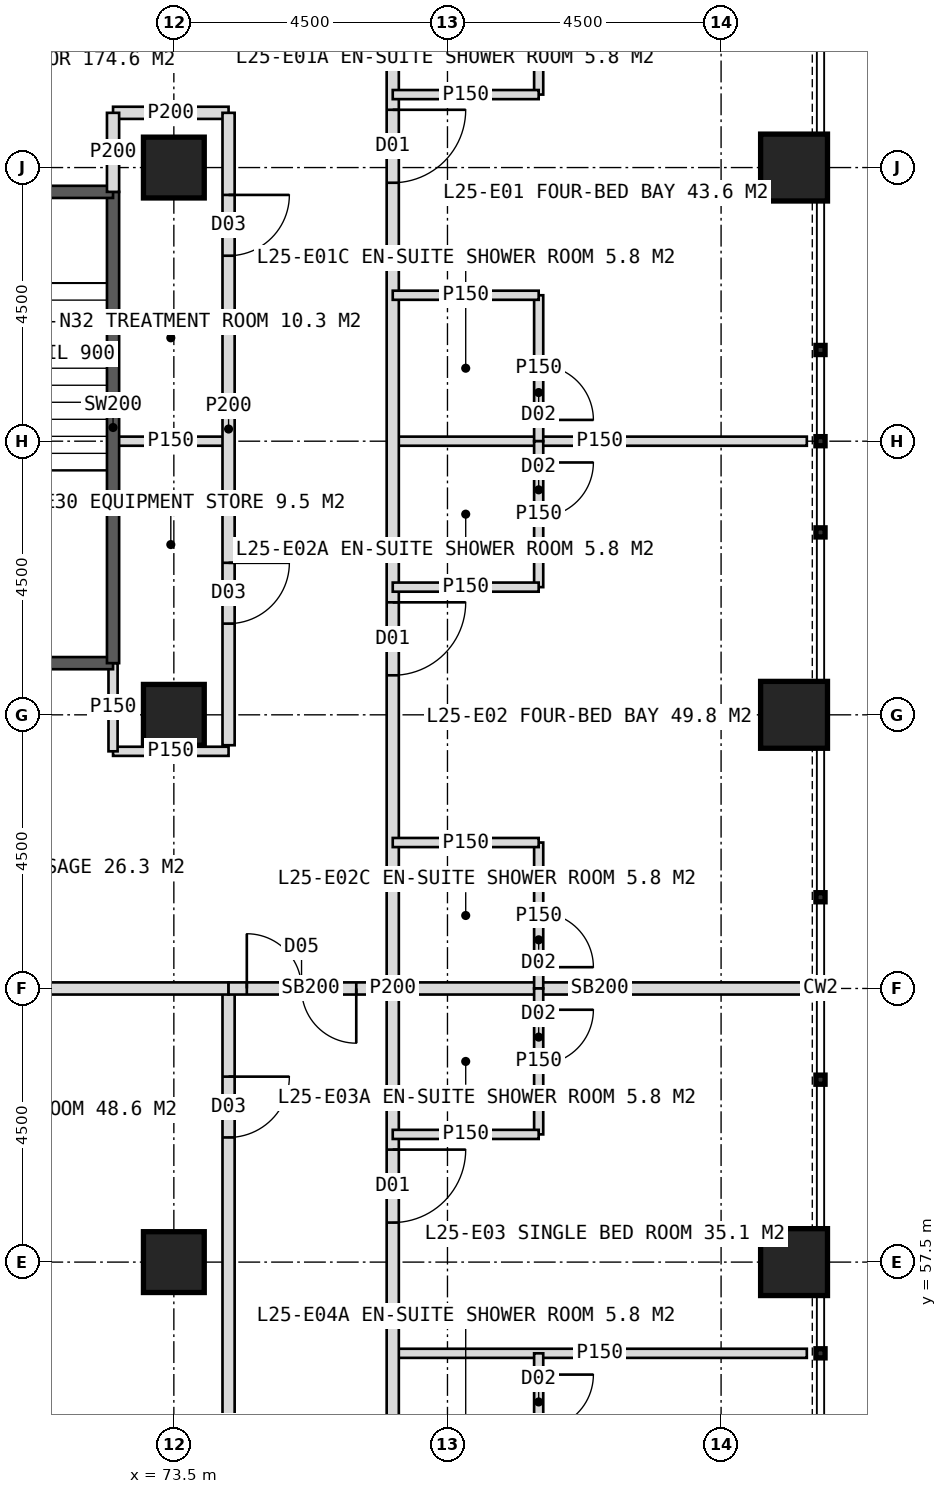
"""IFC4 building model, lengths in metres.
Left out: names, types, materials, properties, quantities, classifications, styles, units other than length and angle.
Written with IfcOpenShell. Run it as: python <this file> out.ifc"""

import sys

from ifc_helpers import new_model, si_unit, direction, frame, frame_2d, origin, origin_2d, place, context, subcontext, project, spatial, rectangle, hollow_rectangle, extrude, element, fill, save


model = new_model("IFC4")
c1 = context("Model", 3, precision=1e-05, world=origin(), true_north=direction((0.0, 1.0)))
c2 = subcontext(c1, "Body", "Model", "MODEL_VIEW")
j1 = project(units=[si_unit("LENGTHUNIT", "METRE"), si_unit("PLANEANGLEUNIT", "RADIAN")], contexts=[c1])
p1 = place(None, origin())
s1 = spatial("IfcSite", under=j1, at=p1, CompositionType="ELEMENT")
p2 = place(p1, origin())
s2 = spatial("IfcBuilding", under=s1, at=p2, CompositionType="ELEMENT")
p3 = place(p2, frame((0.0, 0.0, 108.0)))
s3 = spatial("IfcBuildingStorey", under=s2, at=p3, CompositionType="ELEMENT", Elevation=108.0)
for number, where, z_axis, x_axis in (
    (1, (73.5, 75.5, 0.0), (0.0, 0.0, 1.0), (1.0, 0.0, 0.0)),
    (2, (73.5, 57.5, 0.0), (0.0, 0.0, 1.0), (1.0, 0.0, 0.0)),
    (3, (73.5, 66.5, 0.0), (0.0, 0.0, 1.0), (1.0, 0.0, 0.0)),
):
    element("IfcColumn", number, at=place(p3, frame(where, z_axis=z_axis, x_axis=x_axis)), inside=s3, PredefinedType="COLUMN", context=c2, shape_type="SweptSolid", body=[
        extrude(hollow_rectangle(XDim=1.0, YDim=1.0, WallThickness=0.1, at=origin_2d()), origin(), (0.0, 0.0, 1.0), 4.0),
    ])
for number, where, z_axis, x_axis in (
    (4, (83.7, 57.5, 0.0), (0.0, 0.0, 1.0), (1.0, 0.0, 0.0)),
    (5, (83.7, 66.5, 0.0), (0.0, 0.0, 1.0), (1.0, 0.0, 0.0)),
    (6, (83.7, 75.5, 0.0), (0.0, 0.0, 1.0), (1.0, 0.0, 0.0)),
):
    element("IfcColumn", number, at=place(p3, frame(where, z_axis=z_axis, x_axis=x_axis)), inside=s3, PredefinedType="COLUMN", context=c2, shape_type="SweptSolid", body=[
        extrude(hollow_rectangle(XDim=1.1, YDim=1.1, WallThickness=0.1, at=origin_2d()), origin(), (0.0, 0.0, 1.0), 4.0),
    ])
p4 = place(p3, frame((72.5, 76.4, 0.0), z_axis=(0.0, 0.0, 1.0), x_axis=(1.0, 0.0, 0.0)))
e7 = element("IfcWall", 7, at=p4, inside=s3, PredefinedType="PARTITIONING", context=c2, shape_type="SweptSolid", body=[
    extrude(rectangle(XDim=1.9, YDim=0.2, at=frame_2d((0.95, 0.0))), origin(), (0.0, 0.0, 1.0), 3.75),
])
p5 = place(p3, frame((77.1, 71.0, 0.0), z_axis=(0.0, 0.0, 1.0), x_axis=(1.0, 0.0, 0.0)))
e8 = element("IfcWall", 8, at=p5, inside=s3, PredefinedType="PARTITIONING", context=c2, shape_type="SweptSolid", body=[
    extrude(rectangle(XDim=6.81, YDim=0.15, at=frame_2d((3.405, 0.0))), origin(), (0.0, 0.0, 1.0), 3.75),
])
p6 = place(p3, frame((77.1, 62.0, 0.0), z_axis=(0.0, 0.0, 1.0), x_axis=(1.0, 0.0, 0.0)))
e9 = element("IfcWall", 9, at=p6, inside=s3, PredefinedType="SOLIDWALL", context=c2, shape_type="SweptSolid", body=[
    extrude(rectangle(XDim=6.81, YDim=0.2, at=frame_2d((3.405, 0.0))), origin(), (0.0, 0.0, 1.0), 2.95),
])
p7 = place(p3, frame((77.1, 56.0, 0.0), z_axis=(0.0, 0.0, 1.0), x_axis=(1.0, 0.0, 0.0)))
e10 = element("IfcWall", 10, at=p7, inside=s3, PredefinedType="PARTITIONING", context=c2, shape_type="SweptSolid", body=[
    extrude(rectangle(XDim=6.81, YDim=0.15, at=frame_2d((3.405, 0.0))), origin(), (0.0, 0.0, 1.0), 3.75),
])
p8 = place(p3, frame((77.1, 79.1, 0.0), z_axis=(0.0, 0.0, 1.0), x_axis=(0.0, -1.0, 0.0)))
e11 = element("IfcWall", 11, at=p8, inside=s3, PredefinedType="PARTITIONING", context=c2, shape_type="SweptSolid", body=[
    extrude(rectangle(XDim=34.2, YDim=0.2, at=frame_2d((17.1, 0.0))), origin(), (0.0, 0.0, 1.0), 3.75),
])
p9 = place(p8, frame((2.65, 0.0, 0.0)))
e12 = element("IfcOpeningElement", 12, at=p9, cuts=e11, PredefinedType="OPENING", context=c2, shape_type="SweptSolid", body=[
    extrude(rectangle(XDim=1.2, YDim=2.2, at=frame_2d((0.6, 1.1))), frame((0.0, 0.11, 0.0), z_axis=(0.0, -1.0, 0.0), x_axis=(1.0, 0.0, 0.0)), (0.0, 0.0, 1.0), 0.22),
])
p10 = place(p8, frame((10.75, 0.0, 0.0)))
e13 = element("IfcOpeningElement", 13, at=p10, cuts=e11, PredefinedType="OPENING", context=c2, shape_type="SweptSolid", body=[
    extrude(rectangle(XDim=1.2, YDim=2.2, at=frame_2d((0.6, 1.1))), frame((0.0, 0.11, 0.0), z_axis=(0.0, -1.0, 0.0), x_axis=(1.0, 0.0, 0.0)), (0.0, 0.0, 1.0), 0.22),
])
p11 = place(p8, frame((19.75, 0.0, 0.0)))
e14 = element("IfcOpeningElement", 14, at=p11, cuts=e11, PredefinedType="OPENING", context=c2, shape_type="SweptSolid", body=[
    extrude(rectangle(XDim=1.2, YDim=2.2, at=frame_2d((0.6, 1.1))), frame((0.0, 0.11, 0.0), z_axis=(0.0, -1.0, 0.0), x_axis=(1.0, 0.0, 0.0)), (0.0, 0.0, 1.0), 0.22),
])
p12 = place(p8, frame((25.75, 0.0, 0.0)))
e15 = element("IfcOpeningElement", 15, at=p12, cuts=e11, PredefinedType="OPENING", context=c2, shape_type="SweptSolid", body=[
    extrude(rectangle(XDim=1.2, YDim=2.2, at=frame_2d((0.6, 1.1))), frame((0.0, 0.11, 0.0), z_axis=(0.0, -1.0, 0.0), x_axis=(1.0, 0.0, 0.0)), (0.0, 0.0, 1.0), 0.22),
])
p13 = place(p8, frame((30.25, 0.0, 0.0)))
e16 = element("IfcOpeningElement", 16, at=p13, cuts=e11, PredefinedType="OPENING", context=c2, shape_type="SweptSolid", body=[
    extrude(rectangle(XDim=1.2, YDim=2.2, at=frame_2d((0.6, 1.1))), frame((0.0, 0.11, 0.0), z_axis=(0.0, -1.0, 0.0), x_axis=(1.0, 0.0, 0.0)), (0.0, 0.0, 1.0), 0.22),
])
p14 = place(p3, frame((79.5, 79.1, 0.0), z_axis=(0.0, 0.0, 1.0), x_axis=(0.0, -1.0, 0.0)))
e17 = element("IfcWall", 17, at=p14, inside=s3, PredefinedType="PARTITIONING", context=c2, shape_type="SweptSolid", body=[
    extrude(rectangle(XDim=2.4, YDim=0.15, at=frame_2d((1.2, 0.0))), origin(), (0.0, 0.0, 1.0), 3.75),
])
p15 = place(p14, frame((0.35, 0.0, 0.0)))
e18 = element("IfcOpeningElement", 18, at=p15, cuts=e17, PredefinedType="OPENING", context=c2, shape_type="SweptSolid", body=[
    extrude(rectangle(XDim=0.9, YDim=2.1, at=frame_2d((0.45, 1.05))), frame((0.0, 0.085, 0.0), z_axis=(0.0, -1.0, 0.0), x_axis=(1.0, 0.0, 0.0)), (0.0, 0.0, 1.0), 0.17),
])
p16 = place(p3, frame((77.1, 76.7, 0.0), z_axis=(0.0, 0.0, 1.0), x_axis=(1.0, 0.0, 0.0)))
e19 = element("IfcWall", 19, at=p16, inside=s3, PredefinedType="PARTITIONING", context=c2, shape_type="SweptSolid", body=[
    extrude(rectangle(XDim=2.4, YDim=0.15, at=frame_2d((1.2, 0.0))), origin(), (0.0, 0.0, 1.0), 3.75),
])
p17 = place(p3, frame((79.5, 73.4, 0.0), z_axis=(0.0, 0.0, 1.0), x_axis=(0.0, -1.0, 0.0)))
e20 = element("IfcWall", 20, at=p17, inside=s3, PredefinedType="PARTITIONING", context=c2, shape_type="SweptSolid", body=[
    extrude(rectangle(XDim=2.4, YDim=0.15, at=frame_2d((1.2, 0.0))), origin(), (0.0, 0.0, 1.0), 3.75),
])
p18 = place(p17, frame((1.15, 0.0, 0.0)))
e21 = element("IfcOpeningElement", 21, at=p18, cuts=e20, PredefinedType="OPENING", context=c2, shape_type="SweptSolid", body=[
    extrude(rectangle(XDim=0.9, YDim=2.1, at=frame_2d((0.45, 1.05))), frame((0.0, 0.085, 0.0), z_axis=(0.0, -1.0, 0.0), x_axis=(1.0, 0.0, 0.0)), (0.0, 0.0, 1.0), 0.17),
])
p19 = place(p3, frame((77.1, 73.4, 0.0), z_axis=(0.0, 0.0, 1.0), x_axis=(1.0, 0.0, 0.0)))
e22 = element("IfcWall", 22, at=p19, inside=s3, PredefinedType="PARTITIONING", context=c2, shape_type="SweptSolid", body=[
    extrude(rectangle(XDim=2.4, YDim=0.15, at=frame_2d((1.2, 0.0))), origin(), (0.0, 0.0, 1.0), 3.75),
])
p20 = place(p3, frame((79.5, 71.0, 0.0), z_axis=(0.0, 0.0, 1.0), x_axis=(0.0, -1.0, 0.0)))
e23 = element("IfcWall", 23, at=p20, inside=s3, PredefinedType="PARTITIONING", context=c2, shape_type="SweptSolid", body=[
    extrude(rectangle(XDim=2.4, YDim=0.15, at=frame_2d((1.2, 0.0))), origin(), (0.0, 0.0, 1.0), 3.75),
])
p21 = place(p20, frame((0.35, 0.0, 0.0)))
e24 = element("IfcOpeningElement", 24, at=p21, cuts=e23, PredefinedType="OPENING", context=c2, shape_type="SweptSolid", body=[
    extrude(rectangle(XDim=0.9, YDim=2.1, at=frame_2d((0.45, 1.05))), frame((0.0, 0.085, 0.0), z_axis=(0.0, -1.0, 0.0), x_axis=(1.0, 0.0, 0.0)), (0.0, 0.0, 1.0), 0.17),
])
p22 = place(p3, frame((77.1, 68.6, 0.0), z_axis=(0.0, 0.0, 1.0), x_axis=(1.0, 0.0, 0.0)))
e25 = element("IfcWall", 25, at=p22, inside=s3, PredefinedType="PARTITIONING", context=c2, shape_type="SweptSolid", body=[
    extrude(rectangle(XDim=2.4, YDim=0.15, at=frame_2d((1.2, 0.0))), origin(), (0.0, 0.0, 1.0), 3.75),
])
p23 = place(p3, frame((79.5, 64.4, 0.0), z_axis=(0.0, 0.0, 1.0), x_axis=(0.0, -1.0, 0.0)))
e26 = element("IfcWall", 26, at=p23, inside=s3, PredefinedType="PARTITIONING", context=c2, shape_type="SweptSolid", body=[
    extrude(rectangle(XDim=2.4, YDim=0.15, at=frame_2d((1.2, 0.0))), origin(), (0.0, 0.0, 1.0), 3.75),
])
p24 = place(p23, frame((1.15, 0.0, 0.0)))
e27 = element("IfcOpeningElement", 27, at=p24, cuts=e26, PredefinedType="OPENING", context=c2, shape_type="SweptSolid", body=[
    extrude(rectangle(XDim=0.9, YDim=2.1, at=frame_2d((0.45, 1.05))), frame((0.0, 0.085, 0.0), z_axis=(0.0, -1.0, 0.0), x_axis=(1.0, 0.0, 0.0)), (0.0, 0.0, 1.0), 0.17),
])
p25 = place(p3, frame((77.1, 64.4, 0.0), z_axis=(0.0, 0.0, 1.0), x_axis=(1.0, 0.0, 0.0)))
e28 = element("IfcWall", 28, at=p25, inside=s3, PredefinedType="PARTITIONING", context=c2, shape_type="SweptSolid", body=[
    extrude(rectangle(XDim=2.4, YDim=0.15, at=frame_2d((1.2, 0.0))), origin(), (0.0, 0.0, 1.0), 3.75),
])
p26 = place(p3, frame((79.5, 62.0, 0.0), z_axis=(0.0, 0.0, 1.0), x_axis=(0.0, -1.0, 0.0)))
e29 = element("IfcWall", 29, at=p26, inside=s3, PredefinedType="PARTITIONING", context=c2, shape_type="SweptSolid", body=[
    extrude(rectangle(XDim=2.4, YDim=0.15, at=frame_2d((1.2, 0.0))), origin(), (0.0, 0.0, 1.0), 3.75),
])
p27 = place(p26, frame((0.35, 0.0, 0.0)))
e30 = element("IfcOpeningElement", 30, at=p27, cuts=e29, PredefinedType="OPENING", context=c2, shape_type="SweptSolid", body=[
    extrude(rectangle(XDim=0.9, YDim=2.1, at=frame_2d((0.45, 1.05))), frame((0.0, 0.085, 0.0), z_axis=(0.0, -1.0, 0.0), x_axis=(1.0, 0.0, 0.0)), (0.0, 0.0, 1.0), 0.17),
])
p28 = place(p3, frame((77.1, 59.6, 0.0), z_axis=(0.0, 0.0, 1.0), x_axis=(1.0, 0.0, 0.0)))
e31 = element("IfcWall", 31, at=p28, inside=s3, PredefinedType="PARTITIONING", context=c2, shape_type="SweptSolid", body=[
    extrude(rectangle(XDim=2.4, YDim=0.15, at=frame_2d((1.2, 0.0))), origin(), (0.0, 0.0, 1.0), 3.75),
])
p29 = place(p3, frame((79.5, 56.0, 0.0), z_axis=(0.0, 0.0, 1.0), x_axis=(0.0, -1.0, 0.0)))
e32 = element("IfcWall", 32, at=p29, inside=s3, PredefinedType="PARTITIONING", context=c2, shape_type="SweptSolid", body=[
    extrude(rectangle(XDim=2.4, YDim=0.15, at=frame_2d((1.2, 0.0))), origin(), (0.0, 0.0, 1.0), 3.75),
])
p30 = place(p29, frame((0.35, 0.0, 0.0)))
e33 = element("IfcOpeningElement", 33, at=p30, cuts=e32, PredefinedType="OPENING", context=c2, shape_type="SweptSolid", body=[
    extrude(rectangle(XDim=0.9, YDim=2.1, at=frame_2d((0.45, 1.05))), frame((0.0, 0.085, 0.0), z_axis=(0.0, -1.0, 0.0), x_axis=(1.0, 0.0, 0.0)), (0.0, 0.0, 1.0), 0.17),
])
p31 = place(p3, frame((72.5, 71.0, 0.0), z_axis=(0.0, 0.0, 1.0), x_axis=(1.0, 0.0, 0.0)))
e34 = element("IfcWall", 34, at=p31, inside=s3, PredefinedType="PARTITIONING", context=c2, shape_type="SweptSolid", body=[
    extrude(rectangle(XDim=1.9, YDim=0.15, at=frame_2d((0.95, 0.0))), origin(), (0.0, 0.0, 1.0), 3.75),
])
p32 = place(p3, frame((74.4, 76.4, 0.0), z_axis=(0.0, 0.0, 1.0), x_axis=(0.0, -1.0, 0.0)))
e35 = element("IfcWall", 35, at=p32, inside=s3, PredefinedType="PARTITIONING", context=c2, shape_type="SweptSolid", body=[
    extrude(rectangle(XDim=10.4, YDim=0.2, at=frame_2d((5.2, 0.0))), origin(), (0.0, 0.0, 1.0), 3.75),
])
p33 = place(p32, frame((1.35, 0.0, 0.0)))
e36 = element("IfcOpeningElement", 36, at=p33, cuts=e35, PredefinedType="OPENING", context=c2, shape_type="SweptSolid", body=[
    extrude(rectangle(XDim=1.0, YDim=2.1, at=frame_2d((0.5, 1.05))), frame((0.0, 0.11, 0.0), z_axis=(0.0, -1.0, 0.0), x_axis=(1.0, 0.0, 0.0)), (0.0, 0.0, 1.0), 0.22),
])
p34 = place(p32, frame((7.4, 0.0, 0.0)))
e37 = element("IfcOpeningElement", 37, at=p34, cuts=e35, PredefinedType="OPENING", context=c2, shape_type="SweptSolid", body=[
    extrude(rectangle(XDim=1.0, YDim=2.1, at=frame_2d((0.5, 1.05))), frame((0.0, 0.11, 0.0), z_axis=(0.0, -1.0, 0.0), x_axis=(1.0, 0.0, 0.0)), (0.0, 0.0, 1.0), 0.22),
])
p35 = place(p3, frame((74.4, 62.0, 0.0), z_axis=(0.0, 0.0, 1.0), x_axis=(0.0, -1.0, 0.0)))
e38 = element("IfcWall", 38, at=p35, inside=s3, PredefinedType="PARTITIONING", context=c2, shape_type="SweptSolid", body=[
    extrude(rectangle(XDim=14.4, YDim=0.2, at=frame_2d((7.2, 0.0))), origin(), (0.0, 0.0, 1.0), 3.75),
])
p36 = place(p35, frame((1.45, 0.0, 0.0)))
e39 = element("IfcOpeningElement", 39, at=p36, cuts=e38, PredefinedType="OPENING", context=c2, shape_type="SweptSolid", body=[
    extrude(rectangle(XDim=1.0, YDim=2.1, at=frame_2d((0.5, 1.05))), frame((0.0, 0.11, 0.0), z_axis=(0.0, -1.0, 0.0), x_axis=(1.0, 0.0, 0.0)), (0.0, 0.0, 1.0), 0.22),
])
p37 = place(p35, frame((11.2, 0.0, 0.0)))
e40 = element("IfcOpeningElement", 40, at=p37, cuts=e38, PredefinedType="OPENING", context=c2, shape_type="SweptSolid", body=[
    extrude(rectangle(XDim=1.0, YDim=2.1, at=frame_2d((0.5, 1.05))), frame((0.0, 0.11, 0.0), z_axis=(0.0, -1.0, 0.0), x_axis=(1.0, 0.0, 0.0)), (0.0, 0.0, 1.0), 0.22),
])
p38 = place(p3, frame((72.5, 65.9, 0.0), z_axis=(0.0, 0.0, 1.0), x_axis=(1.0, 0.0, 0.0)))
e41 = element("IfcWall", 41, at=p38, inside=s3, PredefinedType="PARTITIONING", context=c2, shape_type="SweptSolid", body=[
    extrude(rectangle(XDim=1.9, YDim=0.15, at=frame_2d((0.95, 0.0))), origin(), (0.0, 0.0, 1.0), 3.75),
])
p39 = place(p3, frame((69.0, 62.0, 0.0), z_axis=(0.0, 0.0, 1.0), x_axis=(1.0, 0.0, 0.0)))
e42 = element("IfcWall", 42, at=p39, inside=s3, PredefinedType="SOLIDWALL", context=c2, shape_type="SweptSolid", body=[
    extrude(rectangle(XDim=5.4, YDim=0.2, at=frame_2d((2.7, 0.0))), origin(), (0.0, 0.0, 1.0), 2.95),
])
p40 = place(p3, frame((74.4, 62.0, 0.0), z_axis=(0.0, 0.0, 1.0), x_axis=(1.0, 0.0, 0.0)))
e43 = element("IfcWall", 43, at=p40, inside=s3, PredefinedType="SOLIDWALL", context=c2, shape_type="SweptSolid", body=[
    extrude(rectangle(XDim=2.7, YDim=0.2, at=frame_2d((1.35, 0.0))), origin(), (0.0, 0.0, 1.0), 2.95),
])
p41 = place(p40, frame((0.3, 0.0, 0.0)))
e44 = element("IfcOpeningElement", 44, at=p41, cuts=e43, PredefinedType="OPENING", context=c2, shape_type="SweptSolid", body=[
    extrude(rectangle(XDim=1.8, YDim=2.2, at=frame_2d((0.9, 1.1))), frame((0.0, 0.11, 0.0), z_axis=(0.0, -1.0, 0.0), x_axis=(1.0, 0.0, 0.0)), (0.0, 0.0, 1.0), 0.22),
])
p42 = place(p3, frame((72.5, 65.9, 0.0), z_axis=(0.0, 0.0, 1.0), x_axis=(0.0, 1.0, 0.0)))
e45 = element("IfcWall", 45, at=p42, inside=s3, PredefinedType="PARTITIONING", context=c2, shape_type="SweptSolid", body=[
    extrude(rectangle(XDim=1.45, YDim=0.15, at=frame_2d((0.725, 0.0))), origin(), (0.0, 0.0, 1.0), 3.75),
])
p43 = place(p3, frame((69.0, 67.35, 0.0), z_axis=(0.0, 0.0, 1.0), x_axis=(1.0, 0.0, 0.0)))
e46 = element("IfcWall", 46, at=p43, inside=s3, PredefinedType="SOLIDWALL", context=c2, shape_type="SweptSolid", body=[
    extrude(rectangle(XDim=3.5, YDim=0.2, at=frame_2d((1.75, 0.0))), origin(), (0.0, 0.0, 1.0), 3.75),
])
p44 = place(p3, frame((72.5, 67.35, 0.0), z_axis=(0.0, 0.0, 1.0), x_axis=(0.0, 1.0, 0.0)))
e47 = element("IfcWall", 47, at=p44, inside=s3, PredefinedType="SOLIDWALL", context=c2, shape_type="SweptSolid", body=[
    extrude(rectangle(XDim=7.75, YDim=0.2, at=frame_2d((3.875, 0.0))), origin(), (0.0, 0.0, 1.0), 3.75),
])
p45 = place(p3, frame((69.0, 75.1, 0.0), z_axis=(0.0, 0.0, 1.0), x_axis=(1.0, 0.0, 0.0)))
e48 = element("IfcWall", 48, at=p45, inside=s3, PredefinedType="SOLIDWALL", context=c2, shape_type="SweptSolid", body=[
    extrude(rectangle(XDim=3.5, YDim=0.2, at=frame_2d((1.75, 0.0))), origin(), (0.0, 0.0, 1.0), 3.75),
])
p46 = place(p45, frame((1.15, 0.0, 0.0)))
e49 = element("IfcOpeningElement", 49, at=p46, cuts=e48, PredefinedType="OPENING", context=c2, shape_type="SweptSolid", body=[
    extrude(rectangle(XDim=1.2, YDim=2.1, at=frame_2d((0.6, 1.05))), frame((0.0, 0.11, 0.0), z_axis=(0.0, -1.0, 0.0), x_axis=(1.0, 0.0, 0.0)), (0.0, 0.0, 1.0), 0.22),
])
p47 = place(p3, frame((72.5, 75.1, 0.0), z_axis=(0.0, 0.0, 1.0), x_axis=(0.0, 1.0, 0.0)))
e50 = element("IfcWall", 50, at=p47, inside=s3, PredefinedType="PARTITIONING", context=c2, shape_type="SweptSolid", body=[
    extrude(rectangle(XDim=1.3, YDim=0.2, at=frame_2d((0.65, 0.0))), origin(), (0.0, 0.0, 1.0), 3.75),
])
p48 = place(p33, origin())
e51 = element("IfcDoor", 51, at=p48, inside=s3, OperationType="SINGLE_SWING_LEFT", PredefinedType="DOOR", context=c2, shape_type="SweptSolid", body=[
    extrude(rectangle(XDim=1.0, YDim=2.1, at=frame_2d((0.5, 1.05))), frame((0.0, 0.025, 0.0), z_axis=(0.0, -1.0, 0.0), x_axis=(1.0, 0.0, 0.0)), (0.0, 0.0, 1.0), 0.05),
])
fill(e36, e51)
p49 = place(p9, origin())
e52 = element("IfcDoor", 52, at=p49, inside=s3, OperationType="SINGLE_SWING_LEFT", PredefinedType="DOOR", context=c2, shape_type="SweptSolid", body=[
    extrude(rectangle(XDim=1.2, YDim=2.2, at=frame_2d((0.6, 1.1))), frame((0.0, 0.025, 0.0), z_axis=(0.0, -1.0, 0.0), x_axis=(1.0, 0.0, 0.0)), (0.0, 0.0, 1.0), 0.05),
])
fill(e12, e52)
p50 = place(p18, origin())
e53 = element("IfcDoor", 53, at=p50, inside=s3, OperationType="SINGLE_SWING_RIGHT", PredefinedType="DOOR", context=c2, shape_type="SweptSolid", body=[
    extrude(rectangle(XDim=0.9, YDim=2.1, at=frame_2d((0.45, 1.05))), frame((0.0, 0.025, 0.0), z_axis=(0.0, -1.0, 0.0), x_axis=(1.0, 0.0, 0.0)), (0.0, 0.0, 1.0), 0.05),
])
fill(e21, e53)
p51 = place(p10, origin())
e54 = element("IfcDoor", 54, at=p51, inside=s3, OperationType="SINGLE_SWING_LEFT", PredefinedType="DOOR", context=c2, shape_type="SweptSolid", body=[
    extrude(rectangle(XDim=1.2, YDim=2.2, at=frame_2d((0.6, 1.1))), frame((0.0, 0.025, 0.0), z_axis=(0.0, -1.0, 0.0), x_axis=(1.0, 0.0, 0.0)), (0.0, 0.0, 1.0), 0.05),
])
fill(e13, e54)
p52 = place(p21, origin())
e55 = element("IfcDoor", 55, at=p52, inside=s3, OperationType="SINGLE_SWING_LEFT", PredefinedType="DOOR", context=c2, shape_type="SweptSolid", body=[
    extrude(rectangle(XDim=0.9, YDim=2.1, at=frame_2d((0.45, 1.05))), frame((0.0, 0.025, 0.0), z_axis=(0.0, -1.0, 0.0), x_axis=(1.0, 0.0, 0.0)), (0.0, 0.0, 1.0), 0.05),
])
fill(e24, e55)
p53 = place(p24, origin())
e56 = element("IfcDoor", 56, at=p53, inside=s3, OperationType="SINGLE_SWING_RIGHT", PredefinedType="DOOR", context=c2, shape_type="SweptSolid", body=[
    extrude(rectangle(XDim=0.9, YDim=2.1, at=frame_2d((0.45, 1.05))), frame((0.0, 0.025, 0.0), z_axis=(0.0, -1.0, 0.0), x_axis=(1.0, 0.0, 0.0)), (0.0, 0.0, 1.0), 0.05),
])
fill(e27, e56)
p54 = place(p11, origin())
e57 = element("IfcDoor", 57, at=p54, inside=s3, OperationType="SINGLE_SWING_LEFT", PredefinedType="DOOR", context=c2, shape_type="SweptSolid", body=[
    extrude(rectangle(XDim=1.2, YDim=2.2, at=frame_2d((0.6, 1.1))), frame((0.0, 0.025, 0.0), z_axis=(0.0, -1.0, 0.0), x_axis=(1.0, 0.0, 0.0)), (0.0, 0.0, 1.0), 0.05),
])
fill(e14, e57)
p55 = place(p27, origin())
e58 = element("IfcDoor", 58, at=p55, inside=s3, OperationType="SINGLE_SWING_LEFT", PredefinedType="DOOR", context=c2, shape_type="SweptSolid", body=[
    extrude(rectangle(XDim=0.9, YDim=2.1, at=frame_2d((0.45, 1.05))), frame((0.0, 0.025, 0.0), z_axis=(0.0, -1.0, 0.0), x_axis=(1.0, 0.0, 0.0)), (0.0, 0.0, 1.0), 0.05),
])
fill(e30, e58)
p56 = place(p30, origin())
e59 = element("IfcDoor", 59, at=p56, inside=s3, OperationType="SINGLE_SWING_LEFT", PredefinedType="DOOR", context=c2, shape_type="SweptSolid", body=[
    extrude(rectangle(XDim=0.9, YDim=2.1, at=frame_2d((0.45, 1.05))), frame((0.0, 0.025, 0.0), z_axis=(0.0, -1.0, 0.0), x_axis=(1.0, 0.0, 0.0)), (0.0, 0.0, 1.0), 0.05),
])
fill(e33, e59)
p57 = place(p34, origin())
e60 = element("IfcDoor", 60, at=p57, inside=s3, OperationType="SINGLE_SWING_LEFT", PredefinedType="DOOR", context=c2, shape_type="SweptSolid", body=[
    extrude(rectangle(XDim=1.0, YDim=2.1, at=frame_2d((0.5, 1.05))), frame((0.0, 0.025, 0.0), z_axis=(0.0, -1.0, 0.0), x_axis=(1.0, 0.0, 0.0)), (0.0, 0.0, 1.0), 0.05),
])
fill(e37, e60)
p58 = place(p36, origin())
e61 = element("IfcDoor", 61, at=p58, inside=s3, OperationType="SINGLE_SWING_LEFT", PredefinedType="DOOR", context=c2, shape_type="SweptSolid", body=[
    extrude(rectangle(XDim=1.0, YDim=2.1, at=frame_2d((0.5, 1.05))), frame((0.0, 0.025, 0.0), z_axis=(0.0, -1.0, 0.0), x_axis=(1.0, 0.0, 0.0)), (0.0, 0.0, 1.0), 0.05),
])
fill(e39, e61)
p59 = place(p41, origin())
e62 = element("IfcDoor", 62, at=p59, inside=s3, OperationType="DOUBLE_DOOR_DOUBLE_SWING", PredefinedType="DOOR", context=c2, shape_type="SweptSolid", body=[
    extrude(rectangle(XDim=1.8, YDim=2.2, at=frame_2d((0.9, 1.1))), frame((0.0, 0.025, 0.0), z_axis=(0.0, -1.0, 0.0), x_axis=(1.0, 0.0, 0.0)), (0.0, 0.0, 1.0), 0.05),
])
fill(e44, e62)
save(model, sys.argv[1])
